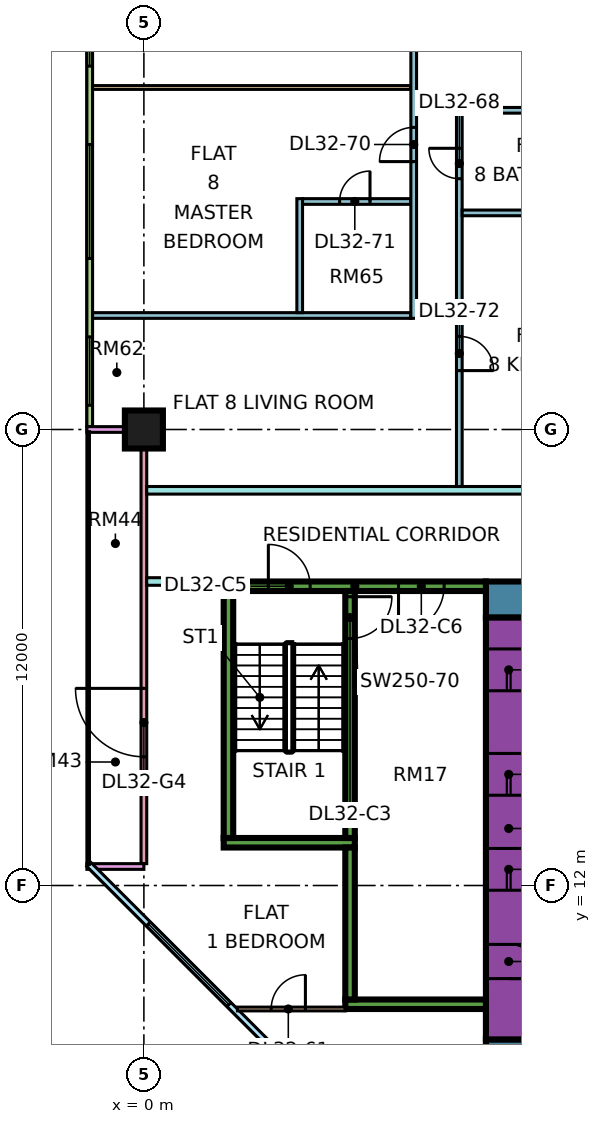
"""IFC4 building model, lengths in metres.
Left out: names, types, materials, properties, quantities, classifications, styles, units other than length and angle.
Written with IfcOpenShell. Run it as: python <this file> out.ifc"""

import sys

from ifc_helpers import new_model, si_unit, direction, frame, frame_2d, origin, origin_2d, place, context, subcontext, project, spatial, rectangle, extrude, element, fill, save


model = new_model("IFC4")
c1 = context("Model", 3, precision=1e-05, world=origin(), true_north=direction((0.0, 1.0)))
c2 = subcontext(c1, "Body", "Model", "MODEL_VIEW")
j1 = project(units=[si_unit("LENGTHUNIT", "METRE"), si_unit("PLANEANGLEUNIT", "RADIAN")], contexts=[c1])
p1 = place(None, origin())
s1 = spatial("IfcSite", under=j1, at=p1, CompositionType="ELEMENT")
p2 = place(p1, origin())
s2 = spatial("IfcBuilding", under=s1, at=p2, CompositionType="ELEMENT")
p3 = place(p2, frame((0.0, 0.0, 136.9)))
s3 = spatial("IfcBuildingStorey", under=s2, at=p3, CompositionType="ELEMENT", Elevation=136.9)
p4 = place(p3, frame((0.0, 24.0, 0.0), z_axis=(0.0, 0.0, 1.0), x_axis=(1.0, 0.0, 0.0)))
e1 = element("IfcColumn", 1, at=p4, inside=s3, PredefinedType="COLUMN", context=c2, shape_type="SweptSolid", body=[
    extrude(rectangle(XDim=1.0, YDim=1.0, at=origin_2d()), origin(), (0.0, 0.0, 1.0), 3.75),
])
p5 = place(p3, frame((9.0, 7.475, 0.0), z_axis=(0.0, 0.0, 1.0), x_axis=(1.0, 0.0, 0.0)))
e2 = element("IfcWall", 2, at=p5, inside=s3, PredefinedType="SHEAR", context=c2, shape_type="SweptSolid", body=[
    extrude(rectangle(XDim=25.0, YDim=0.95, at=frame_2d((12.5, 0.0))), origin(), (0.0, 0.0, 1.0), 3.75),
])
p6 = place(p3, frame((9.0, 19.525, 0.0), z_axis=(0.0, 0.0, 1.0), x_axis=(1.0, 0.0, 0.0)))
e3 = element("IfcWall", 3, at=p6, inside=s3, PredefinedType="SHEAR", context=c2, shape_type="SweptSolid", body=[
    extrude(rectangle(XDim=25.0, YDim=0.95, at=frame_2d((12.5, 0.0))), origin(), (0.0, 0.0, 1.0), 3.75),
])
p7 = place(p6, frame((19.1, 0.0, 0.0)))
e4 = element("IfcOpeningElement", 4, at=p7, cuts=e3, PredefinedType="OPENING", context=c2, shape_type="SweptSolid", body=[
    extrude(rectangle(XDim=1.8, YDim=2.4, at=frame_2d((0.9, 1.2))), frame((0.0, 0.485, 0.0), z_axis=(0.0, -1.0, 0.0), x_axis=(1.0, 0.0, 0.0)), (0.0, 0.0, 1.0), 0.97),
])
p8 = place(p3, frame((9.6, 7.95, 0.0), z_axis=(0.0, 0.0, 1.0), x_axis=(0.0, 1.0, 0.0)))
e5 = element("IfcWall", 5, at=p8, inside=s3, PredefinedType="SHEAR", context=c2, shape_type="SweptSolid", body=[
    extrude(rectangle(XDim=11.1, YDim=1.2, at=frame_2d((5.55, 0.0))), origin(), (0.0, 0.0, 1.0), 3.75),
])
p9 = place(p8, frame((3.925, 0.0, 0.0)))
e6 = element("IfcOpeningElement", 6, at=p9, cuts=e5, PredefinedType="OPENING", context=c2, shape_type="SweptSolid", body=[
    extrude(rectangle(XDim=1.1, YDim=2.2, at=frame_2d((0.55, 1.1))), frame((0.0, 0.61, 0.0), z_axis=(0.0, -1.0, 0.0), x_axis=(1.0, 0.0, 0.0)), (0.0, 0.0, 1.0), 1.22),
])
p10 = place(p8, frame((6.425, 0.0, 0.0)))
e7 = element("IfcOpeningElement", 7, at=p10, cuts=e5, PredefinedType="OPENING", context=c2, shape_type="SweptSolid", body=[
    extrude(rectangle(XDim=1.1, YDim=2.2, at=frame_2d((0.55, 1.1))), frame((0.0, 0.61, 0.0), z_axis=(0.0, -1.0, 0.0), x_axis=(1.0, 0.0, 0.0)), (0.0, 0.0, 1.0), 1.22),
])
p11 = place(p8, frame((9.175, 0.0, 0.0)))
e8 = element("IfcOpeningElement", 8, at=p11, cuts=e5, PredefinedType="OPENING", context=c2, shape_type="SweptSolid", body=[
    extrude(rectangle(XDim=1.1, YDim=2.2, at=frame_2d((0.55, 1.1))), frame((0.0, 0.61, 0.0), z_axis=(0.0, -1.0, 0.0), x_axis=(1.0, 0.0, 0.0)), (0.0, 0.0, 1.0), 1.22),
])
p12 = place(p8, frame((1.6, 0.0, 0.0)))
e9 = element("IfcOpeningElement", 9, at=p12, cuts=e5, PredefinedType="OPENING", context=c2, shape_type="SweptSolid", body=[
    extrude(rectangle(XDim=0.9, YDim=2.1, at=frame_2d((0.45, 1.05))), frame((0.0, 0.61, 0.0), z_axis=(0.0, -1.0, 0.0), x_axis=(1.0, 0.0, 0.0)), (0.0, 0.0, 1.0), 1.22),
])
p13 = place(p3, frame((2.1, 19.875, 0.0), z_axis=(0.0, 0.0, 1.0), x_axis=(1.0, 0.0, 0.0)))
e10 = element("IfcWall", 10, at=p13, inside=s3, PredefinedType="SHEAR", context=c2, shape_type="SweptSolid", body=[
    extrude(rectangle(XDim=6.9, YDim=0.25, at=frame_2d((3.45, 0.0))), origin(), (0.0, 0.0, 1.0), 3.75),
])
p14 = place(p13, frame((1.175, 0.0, 0.0)))
e11 = element("IfcOpeningElement", 11, at=p14, cuts=e10, PredefinedType="OPENING", context=c2, shape_type="SweptSolid", body=[
    extrude(rectangle(XDim=1.1, YDim=2.2, at=frame_2d((0.55, 1.1))), frame((0.0, 0.135, 0.0), z_axis=(0.0, -1.0, 0.0), x_axis=(1.0, 0.0, 0.0)), (0.0, 0.0, 1.0), 0.27),
])
p15 = place(p13, frame((4.6, 0.0, 0.0)))
e12 = element("IfcOpeningElement", 12, at=p15, cuts=e10, PredefinedType="OPENING", context=c2, shape_type="SweptSolid", body=[
    extrude(rectangle(XDim=1.2, YDim=2.2, at=frame_2d((0.6, 1.1))), frame((0.0, 0.135, 0.0), z_axis=(0.0, -1.0, 0.0), x_axis=(1.0, 0.0, 0.0)), (0.0, 0.0, 1.0), 0.27),
])
p16 = place(p3, frame((2.1, 13.125, 0.0), z_axis=(0.0, 0.0, 1.0), x_axis=(1.0, 0.0, 0.0)))
e13 = element("IfcWall", 13, at=p16, inside=s3, PredefinedType="SHEAR", context=c2, shape_type="SweptSolid", body=[
    extrude(rectangle(XDim=3.45, YDim=0.25, at=frame_2d((1.725, 0.0))), origin(), (0.0, 0.0, 1.0), 3.75),
])
p17 = place(p3, frame((2.225, 13.25, 0.0), z_axis=(0.0, 0.0, 1.0), x_axis=(0.0, 1.0, 0.0)))
e14 = element("IfcWall", 14, at=p17, inside=s3, PredefinedType="SHEAR", context=c2, shape_type="SweptSolid", body=[
    extrude(rectangle(XDim=6.5, YDim=0.25, at=frame_2d((3.25, 0.0))), origin(), (0.0, 0.0, 1.0), 3.75),
])
p18 = place(p3, frame((5.425, 13.25, 0.0), z_axis=(0.0, 0.0, 1.0), x_axis=(0.0, 1.0, 0.0)))
e15 = element("IfcWall", 15, at=p18, inside=s3, PredefinedType="SHEAR", context=c2, shape_type="SweptSolid", body=[
    extrude(rectangle(XDim=6.5, YDim=0.25, at=frame_2d((3.25, 0.0))), origin(), (0.0, 0.0, 1.0), 3.75),
])
p19 = place(p18, frame((5.25, 0.0, 0.0)))
e16 = element("IfcOpeningElement", 16, at=p19, cuts=e15, PredefinedType="OPENING", context=c2, shape_type="SweptSolid", body=[
    extrude(rectangle(XDim=1.1, YDim=2.2, at=frame_2d((0.55, 1.1))), frame((0.0, 0.135, 0.0), z_axis=(0.0, -1.0, 0.0), x_axis=(1.0, 0.0, 0.0)), (0.0, 0.0, 1.0), 0.27),
])
p20 = place(p3, frame((5.3, 8.875, 0.0), z_axis=(0.0, 0.0, 1.0), x_axis=(1.0, 0.0, 0.0)))
e17 = element("IfcWall", 17, at=p20, inside=s3, PredefinedType="SHEAR", context=c2, shape_type="SweptSolid", body=[
    extrude(rectangle(XDim=3.7, YDim=0.25, at=frame_2d((1.85, 0.0))), origin(), (0.0, 0.0, 1.0), 3.75),
])
p21 = place(p3, frame((5.425, 9.0, 0.0), z_axis=(0.0, 0.0, 1.0), x_axis=(0.0, 1.0, 0.0)))
e18 = element("IfcWall", 18, at=p21, inside=s3, PredefinedType="SHEAR", context=c2, shape_type="SweptSolid", body=[
    extrude(rectangle(XDim=4.0, YDim=0.25, at=frame_2d((2.0, 0.0))), origin(), (0.0, 0.0, 1.0), 3.75),
])
p22 = place(p3, frame((-1.425, 35.925, 0.0), z_axis=(0.0, 0.0, 1.0), x_axis=(0.0, -1.0, 0.0)))
e19 = element("IfcWall", 19, at=p22, inside=s3, PredefinedType="SOLIDWALL", context=c2, shape_type="SweptSolid", body=[
    extrude(rectangle(XDim=11.85, YDim=0.15, at=frame_2d((5.925, 0.0))), origin(), (0.0, 0.0, 1.0), 3.3),
])
p23 = place(p22, frame((0.562, 0.0, 0.45)))
e20 = element("IfcOpeningElement", 20, at=p23, cuts=e19, PredefinedType="OPENING", context=c2, shape_type="SweptSolid", body=[
    extrude(rectangle(XDim=1.8, YDim=2.4, at=frame_2d((0.9, 1.2))), frame((0.0, 0.085, 0.0), z_axis=(0.0, -1.0, 0.0), x_axis=(1.0, 0.0, 0.0)), (0.0, 0.0, 1.0), 0.17),
])
p24 = place(p22, frame((4.425, 0.0, 0.45)))
e21 = element("IfcOpeningElement", 21, at=p24, cuts=e19, PredefinedType="OPENING", context=c2, shape_type="SweptSolid", body=[
    extrude(rectangle(XDim=3.0, YDim=2.4, at=frame_2d((1.5, 1.2))), frame((0.0, 0.085, 0.0), z_axis=(0.0, -1.0, 0.0), x_axis=(1.0, 0.0, 0.0)), (0.0, 0.0, 1.0), 0.17),
])
p25 = place(p22, frame((9.488, 0.0, 0.45)))
e22 = element("IfcOpeningElement", 22, at=p25, cuts=e19, PredefinedType="OPENING", context=c2, shape_type="SweptSolid", body=[
    extrude(rectangle(XDim=1.8, YDim=2.4, at=frame_2d((0.9, 1.2))), frame((0.0, 0.085, 0.0), z_axis=(0.0, -1.0, 0.0), x_axis=(1.0, 0.0, 0.0)), (0.0, 0.0, 1.0), 0.17),
])
p26 = place(p3, frame((0.0, 23.925, 0.0), z_axis=(0.0, 0.0, 1.0), x_axis=(0.0, -1.0, 0.0)))
e23 = element("IfcWall", 23, at=p26, inside=s3, PredefinedType="SOLIDWALL", context=c2, shape_type="SweptSolid", body=[
    extrude(rectangle(XDim=11.35, YDim=0.15, at=frame_2d((5.675, 0.0))), origin(), (0.0, 0.0, 1.0), 3.3),
])
p27 = place(p26, frame((6.738, 0.0, 0.0)))
e24 = element("IfcOpeningElement", 24, at=p27, cuts=e23, PredefinedType="OPENING", context=c2, shape_type="SweptSolid", body=[
    extrude(rectangle(XDim=1.8, YDim=2.4, at=frame_2d((0.9, 1.2))), frame((0.0, 0.085, 0.0), z_axis=(0.0, -1.0, 0.0), x_axis=(1.0, 0.0, 0.0)), (0.0, 0.0, 1.0), 0.17),
])
for number, where, z_axis, x_axis in (
    (25, (-1.5, 24.0, 0.0), (0.0, 0.0, 1.0), (1.0, 0.0, 0.0)),
    (26, (-1.5, 12.5, 0.0), (0.0, 0.0, 1.0), (1.0, 0.0, 0.0)),
):
    element("IfcWall", number, at=place(p3, frame(where, z_axis=z_axis, x_axis=x_axis)), inside=s3, PredefinedType="SOLIDWALL", context=c2, shape_type="SweptSolid", body=[
        extrude(rectangle(XDim=1.5, YDim=0.15, at=frame_2d((0.75, 0.0))), origin(), (0.0, 0.0, 1.0), 3.3),
    ])
p28 = place(p3, frame((-1.447, 12.553, 0.0), z_axis=(0.0, 0.0, 1.0), x_axis=(0.707106781187, -0.707106781187, 0.0)))
e27 = element("IfcWall", 27, at=p28, inside=s3, PredefinedType="SOLIDWALL", context=c2, shape_type="SweptSolid", body=[
    extrude(rectangle(XDim=19.799, YDim=0.15, at=frame_2d((9.899, 0.0))), origin(), (0.0, 0.0, 1.0), 3.3),
])
p29 = place(p28, frame((2.212, 0.0, 0.45)))
e28 = element("IfcOpeningElement", 28, at=p29, cuts=e27, PredefinedType="OPENING", context=c2, shape_type="SweptSolid", body=[
    extrude(rectangle(XDim=3.0, YDim=2.4, at=frame_2d((1.5, 1.2))), frame((0.0, 0.085, 0.0), z_axis=(0.0, -1.0, 0.0), x_axis=(1.0, 0.0, 0.0)), (0.0, 0.0, 1.0), 0.17),
])
p30 = place(p28, frame((10.216, 0.0, 0.45)))
e29 = element("IfcOpeningElement", 29, at=p30, cuts=e27, PredefinedType="OPENING", context=c2, shape_type="SweptSolid", body=[
    extrude(rectangle(XDim=3.0, YDim=2.4, at=frame_2d((1.5, 1.2))), frame((0.0, 0.085, 0.0), z_axis=(0.0, -1.0, 0.0), x_axis=(1.0, 0.0, 0.0)), (0.0, 0.0, 1.0), 0.17),
])
p31 = place(p3, frame((-1.351, 33.0, 0.0), z_axis=(0.0, 0.0, 1.0), x_axis=(1.0, 0.0, 0.0)))
e30 = element("IfcWall", 30, at=p31, inside=s3, PredefinedType="PARTITIONING", context=c2, shape_type="SweptSolid", body=[
    extrude(rectangle(XDim=8.376, YDim=0.1, at=frame_2d((4.188, 0.0))), origin(), (0.0, 0.0, 1.0), 3.3),
])
p32 = place(p3, frame((-1.35, 27.0, 0.0), z_axis=(0.0, 0.0, 1.0), x_axis=(1.0, 0.0, 0.0)))
e31 = element("IfcWall", 31, at=p32, inside=s3, PredefinedType="PARTITIONING", context=c2, shape_type="SweptSolid", body=[
    extrude(rectangle(XDim=8.375, YDim=0.15, at=frame_2d((4.188, 0.0))), origin(), (0.0, 0.0, 1.0), 3.3),
])
p33 = place(p3, frame((0.074, 20.0, 0.0), z_axis=(0.0, 0.0, 1.0), x_axis=(1.0, 0.0, 0.0)))
e32 = element("IfcWall", 32, at=p33, inside=s3, PredefinedType="PARTITIONING", context=c2, shape_type="SweptSolid", body=[
    extrude(rectangle(XDim=2.026, YDim=0.2, at=frame_2d((1.013, 0.0))), origin(), (0.0, 0.0, 1.0), 3.3),
])
p34 = place(p3, frame((0.074, 22.4, 0.0), z_axis=(0.0, 0.0, 1.0), x_axis=(1.0, 0.0, 0.0)))
e33 = element("IfcWall", 33, at=p34, inside=s3, PredefinedType="PARTITIONING", context=c2, shape_type="SweptSolid", body=[
    extrude(rectangle(XDim=12.326, YDim=0.2, at=frame_2d((6.163, 0.0))), origin(), (0.0, 0.0, 1.0), 3.3),
])
p35 = place(p3, frame((2.461, 8.75, 0.0), z_axis=(0.0, 0.0, 1.0), x_axis=(1.0, 0.0, 0.0)))
e34 = element("IfcWall", 34, at=p35, inside=s3, PredefinedType="PARTITIONING", context=c2, shape_type="SweptSolid", body=[
    extrude(rectangle(XDim=2.839, YDim=0.1, at=frame_2d((1.419, 0.0))), origin(), (0.0, 0.0, 1.0), 3.3),
])
p36 = place(p35, frame((0.889, 0.0, 0.0)))
e35 = element("IfcOpeningElement", 35, at=p36, cuts=e34, PredefinedType="OPENING", context=c2, shape_type="SweptSolid", body=[
    extrude(rectangle(XDim=0.9, YDim=2.1, at=frame_2d((0.45, 1.05))), frame((0.0, 0.06, 0.0), z_axis=(0.0, -1.0, 0.0), x_axis=(1.0, 0.0, 0.0)), (0.0, 0.0, 1.0), 0.12),
])
p37 = place(p3, frame((4.1, 27.075, 0.0), z_axis=(0.0, 0.0, 1.0), x_axis=(0.0, 1.0, 0.0)))
e36 = element("IfcWall", 36, at=p37, inside=s3, PredefinedType="PARTITIONING", context=c2, shape_type="SweptSolid", body=[
    extrude(rectangle(XDim=3.0, YDim=0.15, at=frame_2d((1.5, 0.0))), origin(), (0.0, 0.0, 1.0), 3.3),
])
p38 = place(p3, frame((4.175, 30.0, 0.0), z_axis=(0.0, 0.0, 1.0), x_axis=(1.0, 0.0, 0.0)))
e37 = element("IfcWall", 37, at=p38, inside=s3, PredefinedType="PARTITIONING", context=c2, shape_type="SweptSolid", body=[
    extrude(rectangle(XDim=2.85, YDim=0.15, at=frame_2d((1.425, 0.0))), origin(), (0.0, 0.0, 1.0), 3.3),
])
p39 = place(p38, frame((0.975, 0.0, 0.0)))
e38 = element("IfcOpeningElement", 38, at=p39, cuts=e37, PredefinedType="OPENING", context=c2, shape_type="SweptSolid", body=[
    extrude(rectangle(XDim=0.8, YDim=2.1, at=frame_2d((0.4, 1.05))), frame((0.0, 0.085, 0.0), z_axis=(0.0, -1.0, 0.0), x_axis=(1.0, 0.0, 0.0)), (0.0, 0.0, 1.0), 0.17),
])
p40 = place(p3, frame((7.1, 26.925, 0.0), z_axis=(0.0, 0.0, 1.0), x_axis=(0.0, 1.0, 0.0)))
e39 = element("IfcWall", 39, at=p40, inside=s3, PredefinedType="PARTITIONING", context=c2, shape_type="SweptSolid", body=[
    extrude(rectangle(XDim=8.975, YDim=0.15, at=frame_2d((4.487, 0.0))), origin(), (0.0, 0.0, 1.0), 3.3),
])
p41 = place(p40, frame((7.125, 0.0, 0.0)))
e40 = element("IfcOpeningElement", 40, at=p41, cuts=e39, PredefinedType="OPENING", context=c2, shape_type="SweptSolid", body=[
    extrude(rectangle(XDim=0.9, YDim=2.1, at=frame_2d((0.45, 1.05))), frame((0.0, 0.085, 0.0), z_axis=(0.0, -1.0, 0.0), x_axis=(1.0, 0.0, 0.0)), (0.0, 0.0, 1.0), 0.17),
])
p42 = place(p40, frame((4.125, 0.0, 0.0)))
e41 = element("IfcOpeningElement", 41, at=p42, cuts=e39, PredefinedType="OPENING", context=c2, shape_type="SweptSolid", body=[
    extrude(rectangle(XDim=0.9, YDim=2.1, at=frame_2d((0.45, 1.05))), frame((0.0, 0.085, 0.0), z_axis=(0.0, -1.0, 0.0), x_axis=(1.0, 0.0, 0.0)), (0.0, 0.0, 1.0), 0.17),
])
p43 = place(p3, frame((8.3, 22.5, 0.0), z_axis=(0.0, 0.0, 1.0), x_axis=(0.0, 1.0, 0.0)))
e42 = element("IfcWall", 42, at=p43, inside=s3, PredefinedType="PARTITIONING", context=c2, shape_type="SweptSolid", body=[
    extrude(rectangle(XDim=9.975, YDim=0.15, at=frame_2d((4.988, 0.0))), origin(), (0.0, 0.0, 1.0), 3.3),
])
p44 = place(p43, frame((8.1, 0.0, 0.0)))
e43 = element("IfcOpeningElement", 43, at=p44, cuts=e42, PredefinedType="OPENING", context=c2, shape_type="SweptSolid", body=[
    extrude(rectangle(XDim=0.8, YDim=2.1, at=frame_2d((0.4, 1.05))), frame((0.0, 0.085, 0.0), z_axis=(0.0, -1.0, 0.0), x_axis=(1.0, 0.0, 0.0)), (0.0, 0.0, 1.0), 0.17),
])
p45 = place(p43, frame((3.05, 0.0, 0.0)))
e44 = element("IfcOpeningElement", 44, at=p45, cuts=e42, PredefinedType="OPENING", context=c2, shape_type="SweptSolid", body=[
    extrude(rectangle(XDim=0.9, YDim=2.1, at=frame_2d((0.45, 1.05))), frame((0.0, 0.085, 0.0), z_axis=(0.0, -1.0, 0.0), x_axis=(1.0, 0.0, 0.0)), (0.0, 0.0, 1.0), 0.17),
])
for number, where, z_axis, x_axis in (
    (45, (8.375, 29.7, 0.0), (0.0, 0.0, 1.0), (1.0, 0.0, 0.0)),
    (46, (8.375, 32.4, 0.0), (0.0, 0.0, 1.0), (1.0, 0.0, 0.0)),
):
    element("IfcWall", number, at=place(p3, frame(where, z_axis=z_axis, x_axis=x_axis)), inside=s3, PredefinedType="PARTITIONING", context=c2, shape_type="SweptSolid", body=[
        extrude(rectangle(XDim=4.025, YDim=0.15, at=frame_2d((2.012, 0.0))), origin(), (0.0, 0.0, 1.0), 3.3),
    ])
p46 = place(p23, origin())
e47 = element("IfcWindow", 47, at=p46, inside=s3, PartitioningType="SINGLE_PANEL", PredefinedType="WINDOW", context=c2, shape_type="SweptSolid", body=[
    extrude(rectangle(XDim=1.8, YDim=2.4, at=frame_2d((0.9, 1.2))), frame((0.0, 0.03, 0.0), z_axis=(0.0, -1.0, 0.0), x_axis=(1.0, 0.0, 0.0)), (0.0, 0.0, 1.0), 0.06),
])
fill(e20, e47)
p47 = place(p24, origin())
e48 = element("IfcWindow", 48, at=p47, inside=s3, PartitioningType="SINGLE_PANEL", PredefinedType="WINDOW", context=c2, shape_type="SweptSolid", body=[
    extrude(rectangle(XDim=3.0, YDim=2.4, at=frame_2d((1.5, 1.2))), frame((0.0, 0.03, 0.0), z_axis=(0.0, -1.0, 0.0), x_axis=(1.0, 0.0, 0.0)), (0.0, 0.0, 1.0), 0.06),
])
fill(e21, e48)
p48 = place(p25, origin())
e49 = element("IfcWindow", 49, at=p48, inside=s3, PartitioningType="SINGLE_PANEL", PredefinedType="WINDOW", context=c2, shape_type="SweptSolid", body=[
    extrude(rectangle(XDim=1.8, YDim=2.4, at=frame_2d((0.9, 1.2))), frame((0.0, 0.03, 0.0), z_axis=(0.0, -1.0, 0.0), x_axis=(1.0, 0.0, 0.0)), (0.0, 0.0, 1.0), 0.06),
])
fill(e22, e49)
p49 = place(p27, frame((1.8, 0.0, 0.0), z_axis=(0.0, 0.0, 1.0), x_axis=(-1.0, 0.0, 0.0)))
e50 = element("IfcDoor", 50, at=p49, inside=s3, OperationType="DOUBLE_DOOR_SINGLE_SWING", PredefinedType="DOOR", context=c2, shape_type="SweptSolid", body=[
    extrude(rectangle(XDim=1.8, YDim=2.4, at=frame_2d((0.9, 1.2))), frame((0.0, 0.025, 0.0), z_axis=(0.0, -1.0, 0.0), x_axis=(1.0, 0.0, 0.0)), (0.0, 0.0, 1.0), 0.05),
])
fill(e24, e50)
p50 = place(p29, origin())
e51 = element("IfcWindow", 51, at=p50, inside=s3, PartitioningType="SINGLE_PANEL", PredefinedType="WINDOW", context=c2, shape_type="SweptSolid", body=[
    extrude(rectangle(XDim=3.0, YDim=2.4, at=frame_2d((1.5, 1.2))), frame((0.0, 0.03, 0.0), z_axis=(0.0, -1.0, 0.0), x_axis=(1.0, 0.0, 0.0)), (0.0, 0.0, 1.0), 0.06),
])
fill(e28, e51)
p51 = place(p9, origin())
e52 = element("IfcDoor", 52, at=p51, inside=s3, OperationType="DOUBLE_DOOR_SLIDING", PredefinedType="DOOR", context=c2, shape_type="SweptSolid", body=[
    extrude(rectangle(XDim=1.1, YDim=2.2, at=frame_2d((0.55, 1.1))), frame((0.0, 0.025, 0.0), z_axis=(0.0, -1.0, 0.0), x_axis=(1.0, 0.0, 0.0)), (0.0, 0.0, 1.0), 0.05),
])
fill(e6, e52)
p52 = place(p10, origin())
e53 = element("IfcDoor", 53, at=p52, inside=s3, OperationType="DOUBLE_DOOR_SLIDING", PredefinedType="DOOR", context=c2, shape_type="SweptSolid", body=[
    extrude(rectangle(XDim=1.1, YDim=2.2, at=frame_2d((0.55, 1.1))), frame((0.0, 0.025, 0.0), z_axis=(0.0, -1.0, 0.0), x_axis=(1.0, 0.0, 0.0)), (0.0, 0.0, 1.0), 0.05),
])
fill(e7, e53)
p53 = place(p11, origin())
e54 = element("IfcDoor", 54, at=p53, inside=s3, OperationType="DOUBLE_DOOR_SLIDING", PredefinedType="DOOR", context=c2, shape_type="SweptSolid", body=[
    extrude(rectangle(XDim=1.1, YDim=2.2, at=frame_2d((0.55, 1.1))), frame((0.0, 0.025, 0.0), z_axis=(0.0, -1.0, 0.0), x_axis=(1.0, 0.0, 0.0)), (0.0, 0.0, 1.0), 0.05),
])
fill(e8, e54)
p54 = place(p19, origin())
e55 = element("IfcDoor", 55, at=p54, inside=s3, OperationType="SINGLE_SWING_RIGHT", PredefinedType="DOOR", context=c2, shape_type="SweptSolid", body=[
    extrude(rectangle(XDim=1.1, YDim=2.2, at=frame_2d((0.55, 1.1))), frame((0.0, 0.025, 0.0), z_axis=(0.0, -1.0, 0.0), x_axis=(1.0, 0.0, 0.0)), (0.0, 0.0, 1.0), 0.05),
])
fill(e16, e55)
p55 = place(p12, frame((0.9, 0.0, 0.0), z_axis=(0.0, 0.0, 1.0), x_axis=(-1.0, 0.0, 0.0)))
e56 = element("IfcDoor", 56, at=p55, inside=s3, OperationType="SINGLE_SWING_LEFT", PredefinedType="DOOR", context=c2, shape_type="SweptSolid", body=[
    extrude(rectangle(XDim=0.9, YDim=2.1, at=frame_2d((0.45, 1.05))), frame((0.0, 0.025, 0.0), z_axis=(0.0, -1.0, 0.0), x_axis=(1.0, 0.0, 0.0)), (0.0, 0.0, 1.0), 0.05),
])
fill(e9, e56)
p56 = place(p14, origin())
e57 = element("IfcDoor", 57, at=p56, inside=s3, OperationType="SINGLE_SWING_LEFT", PredefinedType="DOOR", context=c2, shape_type="SweptSolid", body=[
    extrude(rectangle(XDim=1.1, YDim=2.2, at=frame_2d((0.55, 1.1))), frame((0.0, 0.025, 0.0), z_axis=(0.0, -1.0, 0.0), x_axis=(1.0, 0.0, 0.0)), (0.0, 0.0, 1.0), 0.05),
])
fill(e11, e57)
p57 = place(p15, frame((1.2, 0.0, 0.0), z_axis=(0.0, 0.0, 1.0), x_axis=(-1.0, 0.0, 0.0)))
e58 = element("IfcDoor", 58, at=p57, inside=s3, OperationType="SINGLE_SWING_LEFT", PredefinedType="DOOR", context=c2, shape_type="SweptSolid", body=[
    extrude(rectangle(XDim=1.2, YDim=2.2, at=frame_2d((0.6, 1.1))), frame((0.0, 0.025, 0.0), z_axis=(0.0, -1.0, 0.0), x_axis=(1.0, 0.0, 0.0)), (0.0, 0.0, 1.0), 0.05),
])
fill(e12, e58)
p58 = place(p36, frame((0.9, 0.0, 0.0), z_axis=(0.0, 0.0, 1.0), x_axis=(-1.0, 0.0, 0.0)))
e59 = element("IfcDoor", 59, at=p58, inside=s3, OperationType="SINGLE_SWING_RIGHT", PredefinedType="DOOR", context=c2, shape_type="SweptSolid", body=[
    extrude(rectangle(XDim=0.9, YDim=2.1, at=frame_2d((0.45, 1.05))), frame((0.0, 0.025, 0.0), z_axis=(0.0, -1.0, 0.0), x_axis=(1.0, 0.0, 0.0)), (0.0, 0.0, 1.0), 0.05),
])
fill(e35, e59)
p59 = place(p44, frame((0.8, 0.0, 0.0), z_axis=(0.0, 0.0, 1.0), x_axis=(-1.0, 0.0, 0.0)))
e60 = element("IfcDoor", 60, at=p59, inside=s3, OperationType="SINGLE_SWING_RIGHT", PredefinedType="DOOR", context=c2, shape_type="SweptSolid", body=[
    extrude(rectangle(XDim=0.8, YDim=2.1, at=frame_2d((0.4, 1.05))), frame((0.0, 0.025, 0.0), z_axis=(0.0, -1.0, 0.0), x_axis=(1.0, 0.0, 0.0)), (0.0, 0.0, 1.0), 0.05),
])
fill(e43, e60)
p60 = place(p42, origin())
e61 = element("IfcDoor", 61, at=p60, inside=s3, OperationType="SINGLE_SWING_LEFT", PredefinedType="DOOR", context=c2, shape_type="SweptSolid", body=[
    extrude(rectangle(XDim=0.9, YDim=2.1, at=frame_2d((0.45, 1.05))), frame((0.0, 0.025, 0.0), z_axis=(0.0, -1.0, 0.0), x_axis=(1.0, 0.0, 0.0)), (0.0, 0.0, 1.0), 0.05),
])
fill(e41, e61)
p61 = place(p39, frame((0.8, 0.0, 0.0), z_axis=(0.0, 0.0, 1.0), x_axis=(-1.0, 0.0, 0.0)))
e62 = element("IfcDoor", 62, at=p61, inside=s3, OperationType="SINGLE_SWING_RIGHT", PredefinedType="DOOR", context=c2, shape_type="SweptSolid", body=[
    extrude(rectangle(XDim=0.8, YDim=2.1, at=frame_2d((0.4, 1.05))), frame((0.0, 0.025, 0.0), z_axis=(0.0, -1.0, 0.0), x_axis=(1.0, 0.0, 0.0)), (0.0, 0.0, 1.0), 0.05),
])
fill(e38, e62)
p62 = place(p45, frame((0.9, 0.0, 0.0), z_axis=(0.0, 0.0, 1.0), x_axis=(-1.0, 0.0, 0.0)))
e63 = element("IfcDoor", 63, at=p62, inside=s3, OperationType="SINGLE_SWING_LEFT", PredefinedType="DOOR", context=c2, shape_type="SweptSolid", body=[
    extrude(rectangle(XDim=0.9, YDim=2.1, at=frame_2d((0.45, 1.05))), frame((0.0, 0.025, 0.0), z_axis=(0.0, -1.0, 0.0), x_axis=(1.0, 0.0, 0.0)), (0.0, 0.0, 1.0), 0.05),
])
fill(e44, e63)
save(model, sys.argv[1])
